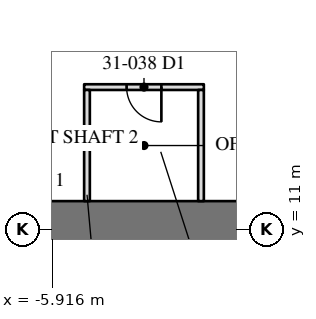
"""IFC4 building model, lengths in metres.
Left out: names, types, materials, properties, quantities, classifications, styles, units other than length and angle.
Written with IfcOpenShell. Run it as: python <this file> out.ifc"""

import sys

from ifc_helpers import new_model, si_unit, direction, frame, frame_2d, origin, place, context, subcontext, project, spatial, rectangle, extrude, element, fill, save


model = new_model("IFC4")
c1 = context("Model", 3, precision=1e-05, world=origin(), true_north=direction((0.0, 1.0)))
c2 = subcontext(c1, "Body", "Model", "MODEL_VIEW")
j1 = project(units=[si_unit("LENGTHUNIT", "METRE"), si_unit("PLANEANGLEUNIT", "RADIAN")], contexts=[c1])
p1 = place(None, origin())
s1 = spatial("IfcSite", under=j1, at=p1, CompositionType="ELEMENT")
p2 = place(p1, origin())
s2 = spatial("IfcBuilding", under=s1, at=p2, CompositionType="ELEMENT")
p3 = place(p2, frame((0.0, 0.0, 133.6)))
s3 = spatial("IfcBuildingStorey", under=s2, at=p3, CompositionType="ELEMENT", Elevation=133.6)
p4 = place(p3, frame((6.5, 11.0, 0.0), z_axis=(0.0, 0.0, 1.0), x_axis=(-1.0, 0.0, 0.0)))
e1 = element("IfcWall", 1, at=p4, inside=s3, PredefinedType="SHEAR", context=c2, shape_type="SweptSolid", body=[
    extrude(rectangle(XDim=13.0, YDim=1.5, at=frame_2d((6.5, 0.0))), origin(), (0.0, 0.0, 1.0), 4.1),
])
p5 = place(p3, frame((-1.925, 14.75, 0.0), z_axis=(0.0, 0.0, 1.0), x_axis=(-1.0, 0.0, 0.0)))
e2 = element("IfcWall", 2, at=p5, inside=s3, PredefinedType="PARTITIONING", context=c2, shape_type="SweptSolid", body=[
    extrude(rectangle(XDim=3.15, YDim=0.15, at=frame_2d((1.575, 0.0))), origin(), (0.0, 0.0, 1.0), 3.91),
])
p6 = place(p5, frame((1.117, 0.0, 0.0)))
e3 = element("IfcOpeningElement", 3, at=p6, cuts=e2, PredefinedType="OPENING", context=c2, shape_type="SweptSolid", body=[
    extrude(rectangle(XDim=0.915, YDim=2.134, at=frame_2d((0.458, 1.067))), frame((0.0, 0.085, 0.0), z_axis=(0.0, -1.0, 0.0), x_axis=(1.0, 0.0, 0.0)), (0.0, 0.0, 1.0), 0.17),
])
for number, where, z_axis, x_axis in (
    (4, (-2.0, 14.675, 0.0), (0.0, 0.0, 1.0), (0.0, -1.0, 0.0)),
    (5, (-5.0, 14.675, 0.0), (0.0, 0.0, 1.0), (0.0, -1.0, 0.0)),
):
    element("IfcWall", number, at=place(p3, frame(where, z_axis=z_axis, x_axis=x_axis)), inside=s3, PredefinedType="PARTITIONING", context=c2, shape_type="SweptSolid", body=[
        extrude(rectangle(XDim=2.925, YDim=0.15, at=frame_2d((1.462, 0.0))), origin(), (0.0, 0.0, 1.0), 3.91),
    ])
p7 = place(p6, origin())
e6 = element("IfcDoor", 6, at=p7, inside=s3, OperationType="SINGLE_SWING_LEFT", PredefinedType="DOOR", context=c2, shape_type="SweptSolid", body=[
    extrude(rectangle(XDim=0.915, YDim=2.134, at=frame_2d((0.458, 1.067))), frame((0.0, 0.025, 0.0), z_axis=(0.0, -1.0, 0.0), x_axis=(1.0, 0.0, 0.0)), (0.0, 0.0, 1.0), 0.05),
])
fill(e3, e6)
save(model, sys.argv[1])
